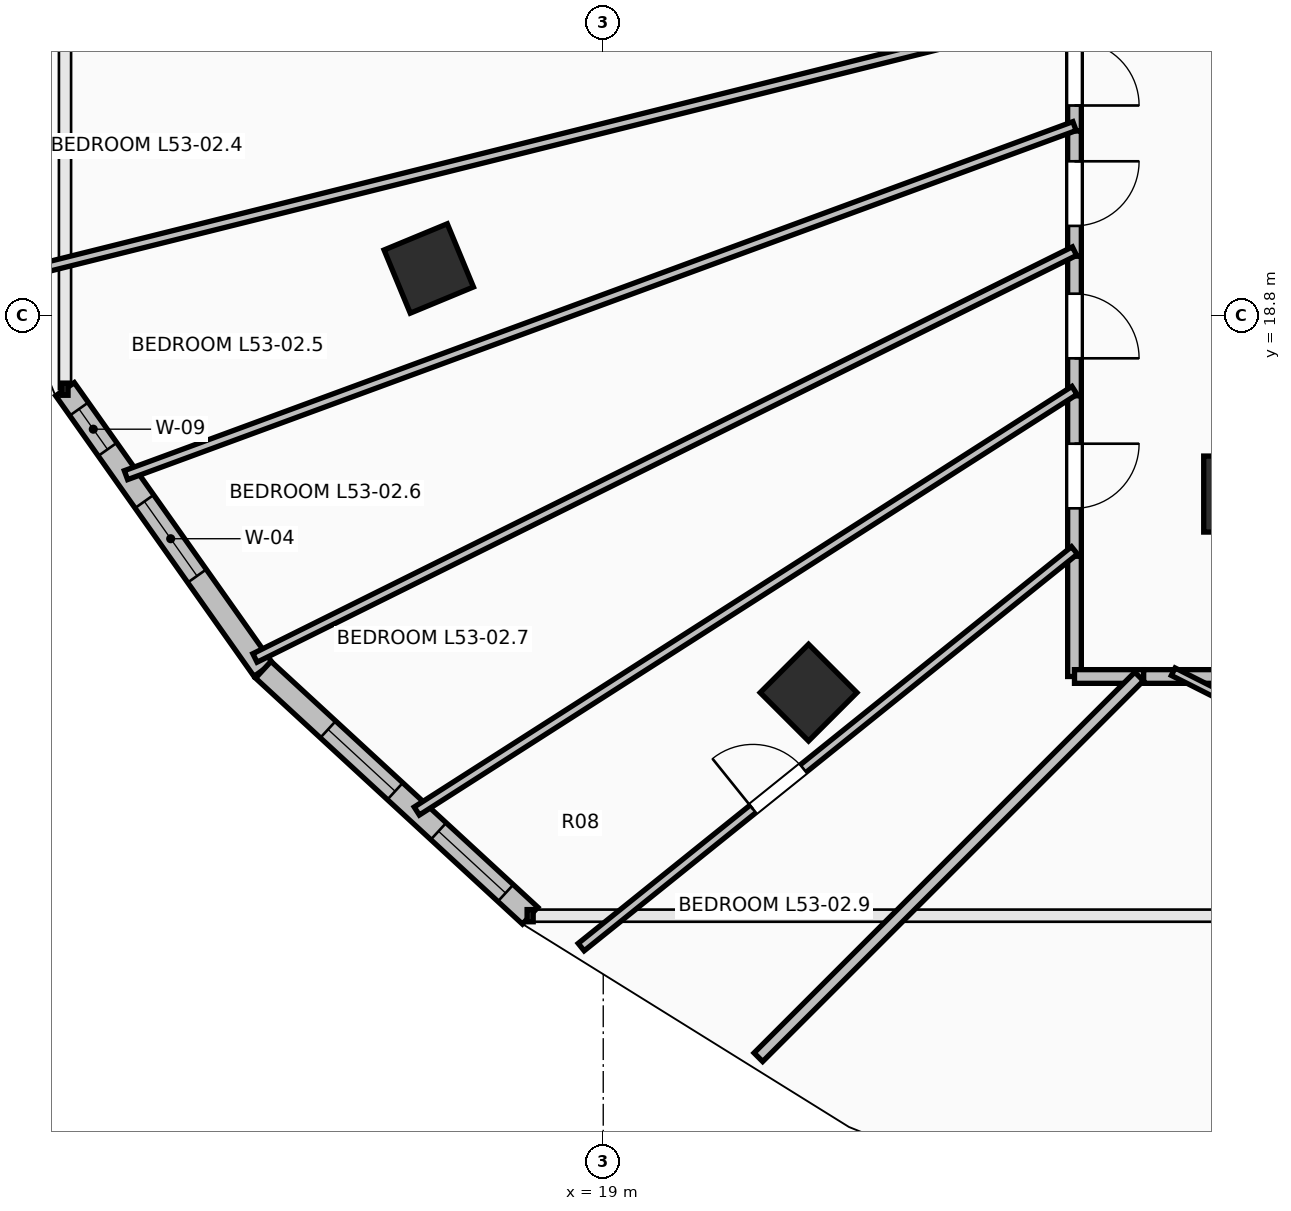
"""IFC4 building model, lengths in metres.
Left out: names, types, materials, properties, quantities, classifications, styles, units other than length and angle.
Written with IfcOpenShell. Run it as: python <this file> out.ifc"""

import sys

from ifc_helpers import new_model, si_unit, direction, frame, frame_2d, origin, origin_2d, place, context, subcontext, project, spatial, rectangle, extrude, element, fill, save


model = new_model("IFC4")
c1 = context("Model", 3, precision=1e-05, world=origin(), true_north=direction((0.0, 1.0)))
c2 = subcontext(c1, "Body", "Model", "MODEL_VIEW")
j1 = project(units=[si_unit("LENGTHUNIT", "METRE"), si_unit("PLANEANGLEUNIT", "RADIAN")], contexts=[c1])
p1 = place(None, origin())
s1 = spatial("IfcSite", under=j1, at=p1, CompositionType="ELEMENT")
p2 = place(p1, origin())
s2 = spatial("IfcBuilding", under=s1, at=p2, CompositionType="ELEMENT")
p3 = place(p2, frame((0.0, 0.0, 196.6)))
s3 = spatial("IfcBuildingStorey", under=s2, at=p3, CompositionType="ELEMENT", Elevation=196.6)
for number, where, z_axis, x_axis in (
    (1, (16.705, 19.418, 0.0), (0.0, 0.0, 1.0), (-0.924, -0.383, 0.0)),
    (2, (21.701, 13.838, 0.0), (0.0, 0.0, 1.0), (-0.707, -0.707, 0.0)),
):
    element("IfcColumn", number, at=place(p3, frame(where, z_axis=z_axis, x_axis=x_axis)), inside=s3, PredefinedType="COLUMN", context=c2, shape_type="SweptSolid", body=[
        extrude(rectangle(XDim=0.9, YDim=0.9, at=origin_2d()), origin(), (0.0, 0.0, 1.0), 3.5),
    ])
p4 = place(p3, frame((27.25, 16.45, 0.0), z_axis=(0.0, 0.0, 1.0), x_axis=(1.0, 0.0, 0.0)))
e3 = element("IfcColumn", 3, at=p4, inside=s3, PredefinedType="PILASTER", context=c2, shape_type="SweptSolid", body=[
    extrude(rectangle(XDim=0.7, YDim=1.0, at=origin_2d()), origin(), (0.0, 0.0, 1.0), 3.5),
])
p5 = place(p3, frame((11.919, 17.83, 0.0), z_axis=(0.0, 0.0, 1.0), x_axis=(0.577168747264, -0.81662490605, 0.0)))
e4 = element("IfcWall", 4, at=p5, inside=s3, PredefinedType="STANDARD", context=c2, shape_type="SweptSolid", body=[
    extrude(rectangle(XDim=4.52, YDim=0.3, at=frame_2d((2.26, 0.0))), origin(), (0.0, 0.0, 1.0), 3.24),
])
p6 = place(p5, frame((0.32, 0.0, 0.85)))
e5 = element("IfcOpeningElement", 5, at=p6, cuts=e4, PredefinedType="OPENING", context=c2, shape_type="SweptSolid", body=[
    extrude(rectangle(XDim=0.65, YDim=1.8, at=frame_2d((0.325, 0.9))), frame((0.0, 0.165, 0.0), z_axis=(0.0, -1.0, 0.0), x_axis=(1.0, 0.0, 0.0)), (0.0, 0.0, 1.0), 0.33),
])
p7 = place(p5, frame((1.809, 0.0, 0.85)))
e6 = element("IfcOpeningElement", 6, at=p7, cuts=e4, PredefinedType="OPENING", context=c2, shape_type="SweptSolid", body=[
    extrude(rectangle(XDim=1.2, YDim=1.95, at=frame_2d((0.6, 0.975))), frame((0.0, 0.165, 0.0), z_axis=(0.0, -1.0, 0.0), x_axis=(1.0, 0.0, 0.0)), (0.0, 0.0, 1.0), 0.33),
])
p8 = place(p3, frame((14.528, 14.139, 0.0), z_axis=(0.0, 0.0, 1.0), x_axis=(0.735359993374, -0.677676678177, 0.0)))
e7 = element("IfcWall", 7, at=p8, inside=s3, PredefinedType="STANDARD", context=c2, shape_type="SweptSolid", body=[
    extrude(rectangle(XDim=4.774, YDim=0.3, at=frame_2d((2.387, 0.0))), origin(), (0.0, 0.0, 1.0), 3.24),
])
p9 = place(p8, frame((1.158, 0.0, 0.85)))
e8 = element("IfcOpeningElement", 8, at=p9, cuts=e7, PredefinedType="OPENING", context=c2, shape_type="SweptSolid", body=[
    extrude(rectangle(XDim=1.2, YDim=1.95, at=frame_2d((0.6, 0.975))), frame((0.0, 0.165, 0.0), z_axis=(0.0, -1.0, 0.0), x_axis=(1.0, 0.0, 0.0)), (0.0, 0.0, 1.0), 0.33),
])
p10 = place(p8, frame((3.135, 0.0, 0.85)))
e9 = element("IfcOpeningElement", 9, at=p10, cuts=e7, PredefinedType="OPENING", context=c2, shape_type="SweptSolid", body=[
    extrude(rectangle(XDim=1.2, YDim=1.95, at=frame_2d((0.6, 0.975))), frame((0.0, 0.165, 0.0), z_axis=(0.0, -1.0, 0.0), x_axis=(1.0, 0.0, 0.0)), (0.0, 0.0, 1.0), 0.33),
])
p11 = place(p3, frame((25.2, 22.747, 0.0), z_axis=(0.0, 0.0, 1.0), x_axis=(0.0, -1.0, 0.0)))
e10 = element("IfcWall", 10, at=p11, inside=s3, PredefinedType="PARTITIONING", context=c2, shape_type="SweptSolid", body=[
    extrude(rectangle(XDim=1.52, YDim=0.18, at=frame_2d((0.76, 0.0))), origin(), (0.0, 0.0, 1.0), 3.24),
])
p12 = place(p11, frame((0.335, 0.0, 0.0)))
e11 = element("IfcOpeningElement", 11, at=p12, cuts=e10, PredefinedType="OPENING", context=c2, shape_type="SweptSolid", body=[
    extrude(rectangle(XDim=0.85, YDim=2.1, at=frame_2d((0.425, 1.05))), frame((0.0, 0.105, 0.0), z_axis=(0.0, -1.0, 0.0), x_axis=(1.0, 0.0, 0.0)), (0.0, 0.0, 1.0), 0.21),
])
p13 = place(p3, frame((25.2, 21.227, 0.0), z_axis=(0.0, 0.0, 1.0), x_axis=(0.0, -1.0, 0.0)))
e12 = element("IfcWall", 12, at=p13, inside=s3, PredefinedType="PARTITIONING", context=c2, shape_type="SweptSolid", body=[
    extrude(rectangle(XDim=1.648, YDim=0.18, at=frame_2d((0.824, 0.0))), origin(), (0.0, 0.0, 1.0), 3.24),
])
p14 = place(p13, frame((0.399, 0.0, 0.0)))
e13 = element("IfcOpeningElement", 13, at=p14, cuts=e12, PredefinedType="OPENING", context=c2, shape_type="SweptSolid", body=[
    extrude(rectangle(XDim=0.85, YDim=2.1, at=frame_2d((0.425, 1.05))), frame((0.0, 0.105, 0.0), z_axis=(0.0, -1.0, 0.0), x_axis=(1.0, 0.0, 0.0)), (0.0, 0.0, 1.0), 0.21),
])
p15 = place(p3, frame((25.2, 19.579, 0.0), z_axis=(0.0, 0.0, 1.0), x_axis=(0.0, -1.0, 0.0)))
e14 = element("IfcWall", 14, at=p15, inside=s3, PredefinedType="PARTITIONING", context=c2, shape_type="SweptSolid", body=[
    extrude(rectangle(XDim=1.836, YDim=0.18, at=frame_2d((0.918, 0.0))), origin(), (0.0, 0.0, 1.0), 3.24),
])
p16 = place(p15, frame((0.493, 0.0, 0.0)))
e15 = element("IfcOpeningElement", 15, at=p16, cuts=e14, PredefinedType="OPENING", context=c2, shape_type="SweptSolid", body=[
    extrude(rectangle(XDim=0.85, YDim=2.1, at=frame_2d((0.425, 1.05))), frame((0.0, 0.105, 0.0), z_axis=(0.0, -1.0, 0.0), x_axis=(1.0, 0.0, 0.0)), (0.0, 0.0, 1.0), 0.21),
])
p17 = place(p3, frame((25.2, 17.743, 0.0), z_axis=(0.0, 0.0, 1.0), x_axis=(0.0, -1.0, 0.0)))
e16 = element("IfcWall", 16, at=p17, inside=s3, PredefinedType="PARTITIONING", context=c2, shape_type="SweptSolid", body=[
    extrude(rectangle(XDim=2.111, YDim=0.18, at=frame_2d((1.055, 0.0))), origin(), (0.0, 0.0, 1.0), 2.432),
])
p18 = place(p17, frame((0.631, 0.0, 0.0)))
e17 = element("IfcOpeningElement", 17, at=p18, cuts=e16, PredefinedType="OPENING", context=c2, shape_type="SweptSolid", body=[
    extrude(rectangle(XDim=0.85, YDim=2.1, at=frame_2d((0.425, 1.05))), frame((0.0, 0.105, 0.0), z_axis=(0.0, -1.0, 0.0), x_axis=(1.0, 0.0, 0.0)), (0.0, 0.0, 1.0), 0.21),
])
p19 = place(p3, frame((25.2, 15.632, 0.0), z_axis=(0.0, 0.0, 1.0), x_axis=(0.0, -1.0, 0.0)))
e18 = element("IfcWall", 18, at=p19, inside=s3, PredefinedType="PARTITIONING", context=c2, shape_type="SweptSolid", body=[
    extrude(rectangle(XDim=1.582, YDim=0.18, at=frame_2d((0.791, 0.0))), origin(), (0.0, 0.0, 1.0), 2.432),
])
p20 = place(p3, frame((25.2, 14.05, 0.0), z_axis=(0.0, 0.0, 1.0), x_axis=(1.0, 0.0, 0.0)))
e19 = element("IfcWall", 19, at=p20, inside=s3, PredefinedType="PARTITIONING", context=c2, shape_type="SweptSolid", body=[
    extrude(rectangle(XDim=0.91, YDim=0.18, at=frame_2d((0.455, 0.0))), origin(), (0.0, 0.0, 1.0), 2.922),
])
p21 = place(p3, frame((26.11, 14.05, 0.0), z_axis=(0.0, 0.0, 1.0), x_axis=(1.0, 0.0, 0.0)))
e20 = element("IfcWall", 20, at=p21, inside=s3, PredefinedType="PARTITIONING", context=c2, shape_type="SweptSolid", body=[
    extrude(rectangle(XDim=0.647, YDim=0.18, at=frame_2d((0.323, 0.0))), origin(), (0.0, 0.0, 1.0), 3.24),
])
p22 = place(p3, frame((26.617, 14.05, 0.0), z_axis=(0.0, 0.0, 1.0), x_axis=(1.0, 0.0, 0.0)))
e21 = element("IfcWall", 21, at=p22, inside=s3, PredefinedType="PARTITIONING", context=c2, shape_type="SweptSolid", body=[
    extrude(rectangle(XDim=5.834, YDim=0.18, at=frame_2d((2.917, 0.0))), origin(), (0.0, 0.0, 1.0), 2.432),
])
p23 = place(p3, frame((10.266, 22.201, 0.0), z_axis=(0.0, 0.0, 1.0), x_axis=(0.990743725495, 0.135745609106, 0.0)))
e22 = element("IfcWall", 22, at=p23, inside=s3, PredefinedType="PARTITIONING", context=c2, shape_type="SweptSolid", body=[
    extrude(rectangle(XDim=15.073, YDim=0.125, at=frame_2d((7.537, 0.0))), origin(), (0.0, 0.0, 1.0), 2.774),
])
p24 = place(p3, frame((11.312, 19.346, 0.0), z_axis=(0.0, 0.0, 1.0), x_axis=(0.970287811835, 0.241953636475, 0.0)))
e23 = element("IfcWall", 23, at=p24, inside=s3, PredefinedType="PARTITIONING", context=c2, shape_type="SweptSolid", body=[
    extrude(rectangle(XDim=14.313, YDim=0.125, at=frame_2d((7.157, 0.0))), origin(), (0.0, 0.0, 1.0), 2.774),
])
p25 = place(p3, frame((12.721, 16.699, 0.0), z_axis=(0.0, 0.0, 1.0), x_axis=(0.938476898763, 0.34534201958, 0.0)))
e24 = element("IfcWall", 24, at=p25, inside=s3, PredefinedType="PARTITIONING", context=c2, shape_type="SweptSolid", body=[
    extrude(rectangle(XDim=13.297, YDim=0.125, at=frame_2d((6.648, 0.0))), origin(), (0.0, 0.0, 1.0), 2.432),
])
p26 = place(p3, frame((14.418, 14.294, 0.0), z_axis=(0.0, 0.0, 1.0), x_axis=(0.895717443483, 0.444623730182, 0.0)))
e25 = element("IfcWall", 25, at=p26, inside=s3, PredefinedType="PARTITIONING", context=c2, shape_type="SweptSolid", body=[
    extrude(rectangle(XDim=12.037, YDim=0.125, at=frame_2d((6.019, 0.0))), origin(), (0.0, 0.0, 1.0), 2.432),
])
p27 = place(p3, frame((16.547, 12.28, 0.0), z_axis=(0.0, 0.0, 1.0), x_axis=(0.842442736758, 0.53878589002, 0.0)))
e26 = element("IfcWall", 26, at=p27, inside=s3, PredefinedType="PARTITIONING", context=c2, shape_type="SweptSolid", body=[
    extrude(rectangle(XDim=10.271, YDim=0.125, at=frame_2d((5.136, 0.0))), origin(), (0.0, 0.0, 1.0), 2.432),
])
p28 = place(p3, frame((18.71, 10.49, 0.0), z_axis=(0.0, 0.0, 1.0), x_axis=(0.779284718529, 0.626670030771, 0.0)))
e27 = element("IfcWall", 27, at=p28, inside=s3, PredefinedType="PARTITIONING", context=c2, shape_type="SweptSolid", body=[
    extrude(rectangle(XDim=8.328, YDim=0.125, at=frame_2d((4.164, 0.0))), origin(), (0.0, 0.0, 1.0), 2.432),
])
p29 = place(p28, frame((2.899, 0.0, 0.0)))
e28 = element("IfcOpeningElement", 28, at=p29, cuts=e27, PredefinedType="OPENING", context=c2, shape_type="SweptSolid", body=[
    extrude(rectangle(XDim=0.85, YDim=2.1, at=frame_2d((0.425, 1.05))), frame((0.0, 0.077, 0.0), z_axis=(0.0, -1.0, 0.0), x_axis=(1.0, 0.0, 0.0)), (0.0, 0.0, 1.0), 0.155),
])
p30 = place(p3, frame((21.041, 9.041, 0.0), z_axis=(0.0, 0.0, 1.0), x_axis=(0.707106781187, 0.707106781187, 0.0)))
e29 = element("IfcWall", 29, at=p30, inside=s3, PredefinedType="PARTITIONING", context=c2, shape_type="SweptSolid", body=[
    extrude(rectangle(XDim=7.084, YDim=0.16, at=frame_2d((3.542, 0.0))), origin(), (0.0, 0.0, 1.0), 2.774),
])
p31 = place(p3, frame((30.533, 12.075, 0.0), z_axis=(0.0, 0.0, 1.0), x_axis=(-0.892550333972, 0.450947781153, 0.0)))
e30 = element("IfcWall", 30, at=p31, inside=s3, PredefinedType="PARTITIONING", context=c2, shape_type="SweptSolid", body=[
    extrude(rectangle(XDim=4.52, YDim=0.11, at=frame_2d((2.26, 0.0))), origin(), (0.0, 0.0, 1.0), 2.432),
])
p32 = place(p31, frame((1.835, 0.0, 0.0)))
e31 = element("IfcOpeningElement", 31, at=p32, cuts=e30, PredefinedType="OPENING", context=c2, shape_type="SweptSolid", body=[
    extrude(rectangle(XDim=0.85, YDim=2.1, at=frame_2d((0.425, 1.05))), frame((0.0, 0.07, 0.0), z_axis=(0.0, -1.0, 0.0), x_axis=(1.0, 0.0, 0.0)), (0.0, 0.0, 1.0), 0.14),
])
p33 = place(p6, origin())
e32 = element("IfcWindow", 32, at=p33, inside=s3, PartitioningType="SINGLE_PANEL", PredefinedType="WINDOW", context=c2, shape_type="SweptSolid", body=[
    extrude(rectangle(XDim=0.65, YDim=1.8, at=frame_2d((0.325, 0.9))), frame((0.0, 0.03, 0.0), z_axis=(0.0, -1.0, 0.0), x_axis=(1.0, 0.0, 0.0)), (0.0, 0.0, 1.0), 0.06),
])
fill(e5, e32)
p34 = place(p7, origin())
e33 = element("IfcWindow", 33, at=p34, inside=s3, PartitioningType="SINGLE_PANEL", PredefinedType="WINDOW", context=c2, shape_type="SweptSolid", body=[
    extrude(rectangle(XDim=1.2, YDim=1.95, at=frame_2d((0.6, 0.975))), frame((0.0, 0.03, 0.0), z_axis=(0.0, -1.0, 0.0), x_axis=(1.0, 0.0, 0.0)), (0.0, 0.0, 1.0), 0.06),
])
fill(e6, e33)
p35 = place(p9, origin())
e34 = element("IfcWindow", 34, at=p35, inside=s3, PartitioningType="SINGLE_PANEL", PredefinedType="WINDOW", context=c2, shape_type="SweptSolid", body=[
    extrude(rectangle(XDim=1.2, YDim=1.95, at=frame_2d((0.6, 0.975))), frame((0.0, 0.03, 0.0), z_axis=(0.0, -1.0, 0.0), x_axis=(1.0, 0.0, 0.0)), (0.0, 0.0, 1.0), 0.06),
])
fill(e8, e34)
p36 = place(p10, origin())
e35 = element("IfcWindow", 35, at=p36, inside=s3, PartitioningType="SINGLE_PANEL", PredefinedType="WINDOW", context=c2, shape_type="SweptSolid", body=[
    extrude(rectangle(XDim=1.2, YDim=1.95, at=frame_2d((0.6, 0.975))), frame((0.0, 0.03, 0.0), z_axis=(0.0, -1.0, 0.0), x_axis=(1.0, 0.0, 0.0)), (0.0, 0.0, 1.0), 0.06),
])
fill(e9, e35)
p37 = place(p12, origin())
e36 = element("IfcDoor", 36, at=p37, inside=s3, OperationType="SINGLE_SWING_RIGHT", PredefinedType="DOOR", context=c2, shape_type="SweptSolid", body=[
    extrude(rectangle(XDim=0.85, YDim=2.1, at=frame_2d((0.425, 1.05))), frame((0.0, 0.025, 0.0), z_axis=(0.0, -1.0, 0.0), x_axis=(1.0, 0.0, 0.0)), (0.0, 0.0, 1.0), 0.05),
])
fill(e11, e36)
p38 = place(p14, origin())
e37 = element("IfcDoor", 37, at=p38, inside=s3, OperationType="SINGLE_SWING_LEFT", PredefinedType="DOOR", context=c2, shape_type="SweptSolid", body=[
    extrude(rectangle(XDim=0.85, YDim=2.1, at=frame_2d((0.425, 1.05))), frame((0.0, 0.025, 0.0), z_axis=(0.0, -1.0, 0.0), x_axis=(1.0, 0.0, 0.0)), (0.0, 0.0, 1.0), 0.05),
])
fill(e13, e37)
p39 = place(p16, origin())
e38 = element("IfcDoor", 38, at=p39, inside=s3, OperationType="SINGLE_SWING_RIGHT", PredefinedType="DOOR", context=c2, shape_type="SweptSolid", body=[
    extrude(rectangle(XDim=0.85, YDim=2.1, at=frame_2d((0.425, 1.05))), frame((0.0, 0.025, 0.0), z_axis=(0.0, -1.0, 0.0), x_axis=(1.0, 0.0, 0.0)), (0.0, 0.0, 1.0), 0.05),
])
fill(e15, e38)
p40 = place(p18, origin())
e39 = element("IfcDoor", 39, at=p40, inside=s3, OperationType="SINGLE_SWING_LEFT", PredefinedType="DOOR", context=c2, shape_type="SweptSolid", body=[
    extrude(rectangle(XDim=0.85, YDim=2.1, at=frame_2d((0.425, 1.05))), frame((0.0, 0.025, 0.0), z_axis=(0.0, -1.0, 0.0), x_axis=(1.0, 0.0, 0.0)), (0.0, 0.0, 1.0), 0.05),
])
fill(e17, e39)
p41 = place(p29, origin())
e40 = element("IfcDoor", 40, at=p41, inside=s3, OperationType="SINGLE_SWING_LEFT", PredefinedType="DOOR", context=c2, shape_type="SweptSolid", body=[
    extrude(rectangle(XDim=0.85, YDim=2.1, at=frame_2d((0.425, 1.05))), frame((0.0, 0.025, 0.0), z_axis=(0.0, -1.0, 0.0), x_axis=(1.0, 0.0, 0.0)), (0.0, 0.0, 1.0), 0.05),
])
fill(e28, e40)
save(model, sys.argv[1])
